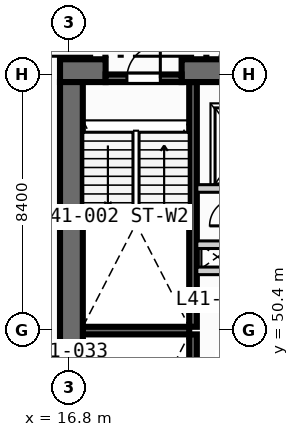
"""IFC4 building model, lengths in metres.
Left out: names, types, materials, properties, quantities, classifications, styles, units other than length and angle.
Written with IfcOpenShell. Run it as: python <this file> out.ifc"""

import sys

from ifc_helpers import new_model, si_unit, direction, frame, frame_2d, origin, place, context, subcontext, project, spatial, rectangle, extrude, element, fill, save


model = new_model("IFC4")
c1 = context("Model", 3, precision=1e-05, world=origin(), true_north=direction((0.0, 1.0)))
c2 = subcontext(c1, "Body", "Model", "MODEL_VIEW")
j1 = project(units=[si_unit("LENGTHUNIT", "METRE"), si_unit("PLANEANGLEUNIT", "RADIAN")], contexts=[c1])
p1 = place(None, origin())
s1 = spatial("IfcSite", under=j1, at=p1, CompositionType="ELEMENT")
p2 = place(p1, origin())
s2 = spatial("IfcBuilding", under=s1, at=p2, CompositionType="ELEMENT")
p3 = place(p2, frame((0.0, 0.0, 171.7)))
s3 = spatial("IfcBuildingStorey", under=s2, at=p3, CompositionType="ELEMENT", Elevation=171.7)
for number, where, z_axis, x_axis in (
    (1, (20.875, 42.2, 0.0), (0.0, 0.0, 1.0), (0.0, 1.0, 0.0)),
    (2, (20.875, 50.5, 0.0), (0.0, 0.0, 1.0), (0.0, 1.0, 0.0)),
):
    element("IfcWall", number, at=place(p3, frame(where, z_axis=z_axis, x_axis=x_axis)), inside=s3, PredefinedType="SOLIDWALL", context=c2, shape_type="SweptSolid", body=[
        extrude(rectangle(XDim=8.05, YDim=0.25, at=frame_2d((4.025, 0.0))), origin(), (0.0, 0.0, 1.0), 3.47),
    ])
p4 = place(p3, frame((17.25, 50.375, 0.0), z_axis=(0.0, 0.0, 1.0), x_axis=(1.0, 0.0, 0.0)))
e3 = element("IfcWall", 3, at=p4, inside=s3, PredefinedType="SOLIDWALL", context=c2, shape_type="SweptSolid", body=[
    extrude(rectangle(XDim=3.5, YDim=0.25, at=frame_2d((1.75, 0.0))), origin(), (0.0, 0.0, 1.0), 3.47),
])
p5 = place(p3, frame((16.5, 58.925, 0.0), z_axis=(0.0, 0.0, 1.0), x_axis=(1.0, 0.0, 0.0)))
e4 = element("IfcWall", 4, at=p5, inside=s3, PredefinedType="SHEAR", context=c2, shape_type="SweptSolid", body=[
    extrude(rectangle(XDim=1.5, YDim=0.75, at=frame_2d((0.75, 0.0))), origin(), (0.0, 0.0, 1.0), 3.47),
])
p6 = place(p3, frame((20.5, 58.925, 0.0), z_axis=(0.0, 0.0, 1.0), x_axis=(1.0, 0.0, 0.0)))
e5 = element("IfcWall", 5, at=p6, inside=s3, PredefinedType="SHEAR", context=c2, shape_type="SweptSolid", body=[
    extrude(rectangle(XDim=5.075, YDim=0.75, at=frame_2d((2.538, 0.0))), origin(), (0.0, 0.0, 1.0), 3.47),
])
p7 = place(p3, frame((16.875, 42.2, 0.0), z_axis=(0.0, 0.0, 1.0), x_axis=(0.0, 1.0, 0.0)))
e6 = element("IfcWall", 6, at=p7, inside=s3, PredefinedType="SHEAR", context=c2, shape_type="SweptSolid", body=[
    extrude(rectangle(XDim=16.35, YDim=0.75, at=frame_2d((8.175, 0.0))), origin(), (0.0, 0.0, 1.0), 3.47),
])
p8 = place(p3, frame((18.0, 58.675, 0.0), z_axis=(0.0, 0.0, 1.0), x_axis=(1.0, 0.0, 0.0)))
e7 = element("IfcWall", 7, at=p8, inside=s3, PredefinedType="SOLIDWALL", context=c2, shape_type="SweptSolid", body=[
    extrude(rectangle(XDim=2.5, YDim=0.25, at=frame_2d((1.25, 0.0))), origin(), (0.0, 0.0, 1.0), 3.47),
])
p9 = place(p8, frame((0.7, 0.0, 0.0)))
e8 = element("IfcOpeningElement", 8, at=p9, cuts=e7, PredefinedType="OPENING", context=c2, shape_type="SweptSolid", body=[
    extrude(rectangle(XDim=1.1, YDim=2.15, at=frame_2d((0.55, 1.075))), frame((0.0, 0.135, 0.0), z_axis=(0.0, -1.0, 0.0), x_axis=(1.0, 0.0, 0.0)), (0.0, 0.0, 1.0), 0.27),
])
p10 = place(p3, frame((21.0, 52.34, 0.0), z_axis=(0.0, 0.0, 1.0), x_axis=(1.0, 0.0, 0.0)))
e9 = element("IfcWall", 9, at=p10, inside=s3, PredefinedType="SOLIDWALL", context=c2, shape_type="SweptSolid", body=[
    extrude(rectangle(XDim=3.825, YDim=0.25, at=frame_2d((1.913, 0.0))), origin(), (0.0, 0.0, 1.0), 3.47),
])
p11 = place(p3, frame((21.0, 55.05, 0.0), z_axis=(0.0, 0.0, 1.0), x_axis=(1.0, 0.0, 0.0)))
e10 = element("IfcWall", 10, at=p11, inside=s3, PredefinedType="SOLIDWALL", context=c2, shape_type="SweptSolid", body=[
    extrude(rectangle(XDim=4.15, YDim=0.25, at=frame_2d((2.075, 0.0))), origin(), (0.0, 0.0, 1.0), 3.47),
])
p12 = place(p11, frame((1.85, 0.0, 0.0)))
e11 = element("IfcOpeningElement", 11, at=p12, cuts=e10, PredefinedType="OPENING", context=c2, shape_type="SweptSolid", body=[
    extrude(rectangle(XDim=1.1, YDim=2.15, at=frame_2d((0.55, 1.075))), frame((0.0, 0.135, 0.0), z_axis=(0.0, -1.0, 0.0), x_axis=(1.0, 0.0, 0.0)), (0.0, 0.0, 1.0), 0.27),
])
p13 = place(p3, frame((21.0, 53.2, 0.0), z_axis=(0.0, 0.0, 1.0), x_axis=(1.0, 0.0, 0.0)))
e12 = element("IfcWall", 12, at=p13, inside=s3, PredefinedType="SOLIDWALL", context=c2, shape_type="SweptSolid", body=[
    extrude(rectangle(XDim=1.3, YDim=0.25, at=frame_2d((0.65, 0.0))), origin(), (0.0, 0.0, 1.0), 3.47),
])
p14 = place(p9, origin())
e13 = element("IfcDoor", 13, at=p14, inside=s3, OperationType="SINGLE_SWING_RIGHT", PredefinedType="DOOR", context=c2, shape_type="SweptSolid", body=[
    extrude(rectangle(XDim=1.1, YDim=2.15, at=frame_2d((0.55, 1.075))), frame((0.0, 0.025, 0.0), z_axis=(0.0, -1.0, 0.0), x_axis=(1.0, 0.0, 0.0)), (0.0, 0.0, 1.0), 0.05),
])
fill(e8, e13)
save(model, sys.argv[1])
